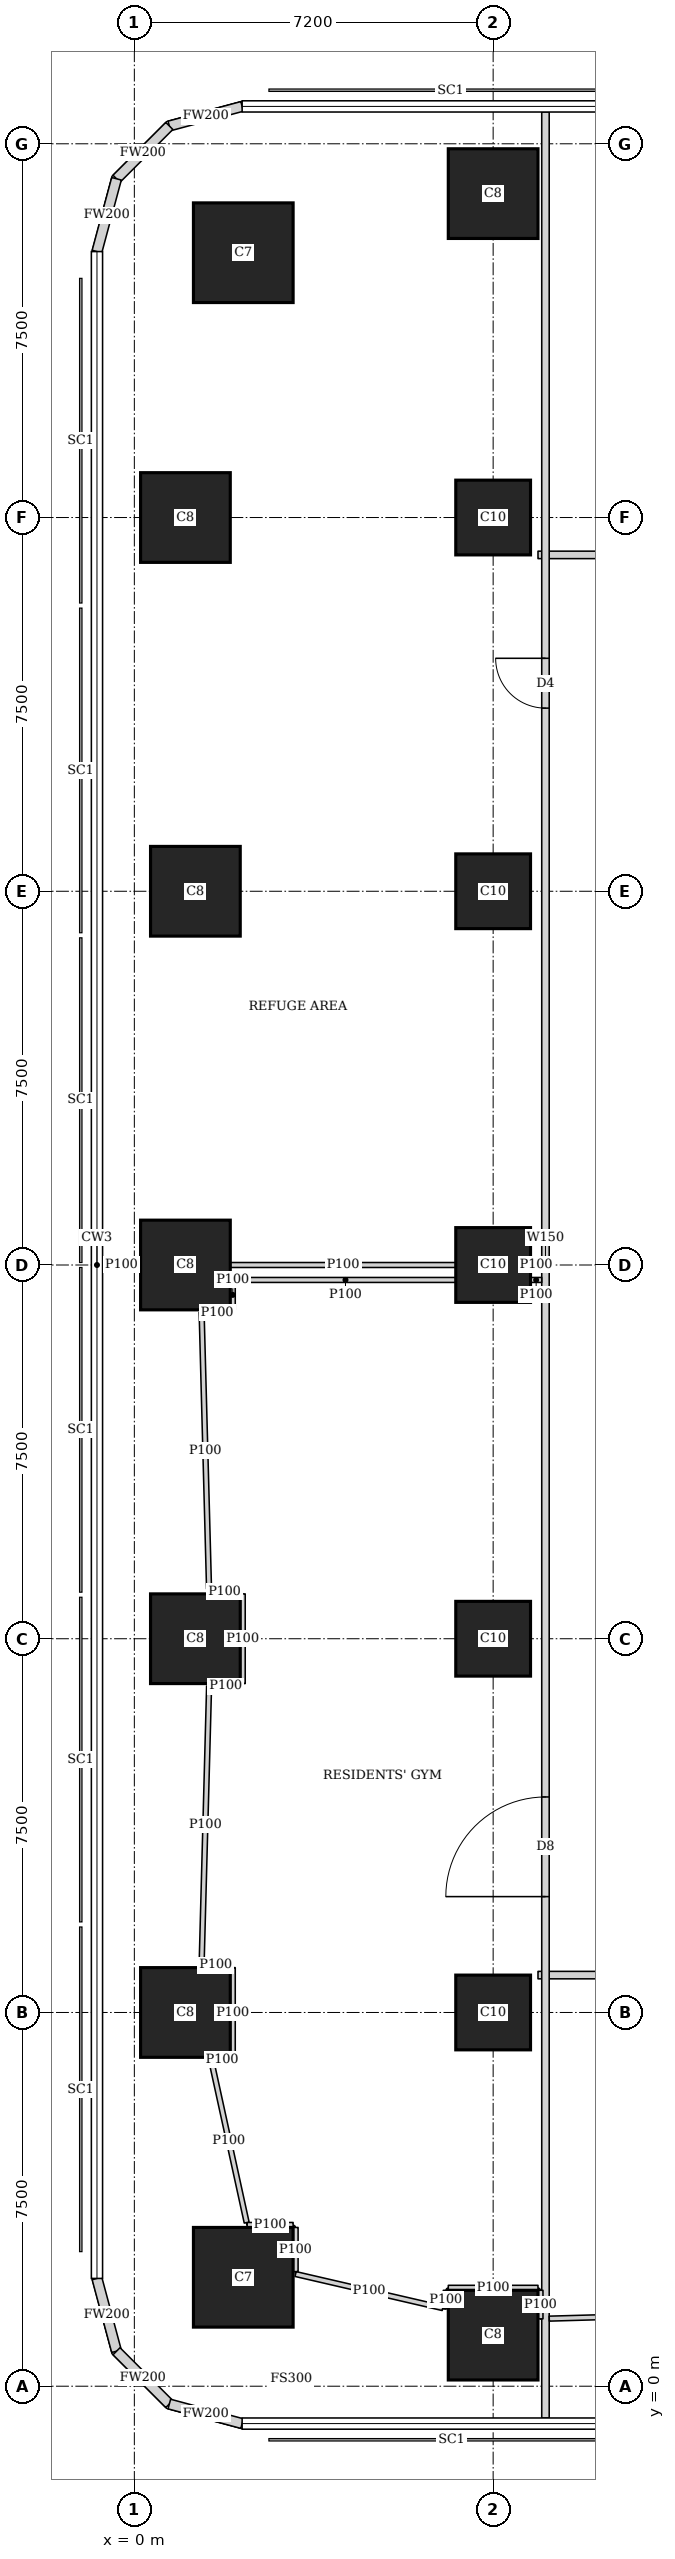
"""IFC4 building model, lengths in metres.
Left out: names, types, materials, properties, quantities, classifications, styles, units other than length and angle.
Written with IfcOpenShell. Run it as: python <this file> out.ifc"""

import sys

from ifc_helpers import new_model, si_unit, direction, frame, frame_2d, origin, origin_2d, place, context, subcontext, project, spatial, rectangle, extrude, element, fill, save


model = new_model("IFC4")
c1 = context("Model", 3, precision=1e-05, world=origin(), true_north=direction((0.0, 1.0)))
c2 = subcontext(c1, "Body", "Model", "MODEL_VIEW")
j1 = project(units=[si_unit("LENGTHUNIT", "METRE"), si_unit("PLANEANGLEUNIT", "RADIAN")], contexts=[c1])
p1 = place(None, origin())
s1 = spatial("IfcSite", under=j1, at=p1, CompositionType="ELEMENT")
p2 = place(p1, origin())
s2 = spatial("IfcBuilding", under=s1, at=p2, CompositionType="ELEMENT")
p3 = place(p2, frame((0.0, 0.0, 188.3)))
s3 = spatial("IfcBuildingStorey", under=s2, at=p3, CompositionType="ELEMENT", Elevation=188.3)
p4 = place(p3, frame((7.2, 1.025, 0.0), z_axis=(0.0, 0.0, 1.0), x_axis=(1.0, 0.0, 0.0)))
e1 = element("IfcColumn", 1, at=p4, inside=s3, PredefinedType="COLUMN", context=c2, shape_type="SweptSolid", body=[
    extrude(rectangle(XDim=1.8, YDim=1.8, at=origin_2d()), origin(), (0.0, 0.0, 1.0), 5.4),
])
p5 = place(p3, frame((2.186, 2.186, 0.0), z_axis=(0.0, 0.0, 1.0), x_axis=(1.0, 0.0, 0.0)))
e2 = element("IfcColumn", 2, at=p5, inside=s3, PredefinedType="COLUMN", context=c2, shape_type="SweptSolid", body=[
    extrude(rectangle(XDim=2.0, YDim=2.0, at=origin_2d()), origin(), (0.0, 0.0, 1.0), 5.4),
])
p6 = place(p3, frame((1.025, 7.5, 0.0), z_axis=(0.0, 0.0, 1.0), x_axis=(1.0, 0.0, 0.0)))
e3 = element("IfcColumn", 3, at=p6, inside=s3, PredefinedType="COLUMN", context=c2, shape_type="SweptSolid", body=[
    extrude(rectangle(XDim=1.8, YDim=1.8, at=origin_2d()), origin(), (0.0, 0.0, 1.0), 5.4),
])
p7 = place(p3, frame((7.2, 7.5, 0.0), z_axis=(0.0, 0.0, 1.0), x_axis=(1.0, 0.0, 0.0)))
e4 = element("IfcColumn", 4, at=p7, inside=s3, PredefinedType="COLUMN", context=c2, shape_type="SweptSolid", body=[
    extrude(rectangle(XDim=1.5, YDim=1.5, at=origin_2d()), origin(), (0.0, 0.0, 1.0), 5.4),
])
p8 = place(p3, frame((1.225, 15.0, 0.0), z_axis=(0.0, 0.0, 1.0), x_axis=(1.0, 0.0, 0.0)))
e5 = element("IfcColumn", 5, at=p8, inside=s3, PredefinedType="COLUMN", context=c2, shape_type="SweptSolid", body=[
    extrude(rectangle(XDim=1.8, YDim=1.8, at=origin_2d()), origin(), (0.0, 0.0, 1.0), 5.4),
])
p9 = place(p3, frame((7.2, 15.0, 0.0), z_axis=(0.0, 0.0, 1.0), x_axis=(1.0, 0.0, 0.0)))
e6 = element("IfcColumn", 6, at=p9, inside=s3, PredefinedType="COLUMN", context=c2, shape_type="SweptSolid", body=[
    extrude(rectangle(XDim=1.5, YDim=1.5, at=origin_2d()), origin(), (0.0, 0.0, 1.0), 5.4),
])
p10 = place(p3, frame((1.025, 22.5, 0.0), z_axis=(0.0, 0.0, 1.0), x_axis=(1.0, 0.0, 0.0)))
e7 = element("IfcColumn", 7, at=p10, inside=s3, PredefinedType="COLUMN", context=c2, shape_type="SweptSolid", body=[
    extrude(rectangle(XDim=1.8, YDim=1.8, at=origin_2d()), origin(), (0.0, 0.0, 1.0), 5.4),
])
p11 = place(p3, frame((7.2, 22.5, 0.0), z_axis=(0.0, 0.0, 1.0), x_axis=(1.0, 0.0, 0.0)))
e8 = element("IfcColumn", 8, at=p11, inside=s3, PredefinedType="COLUMN", context=c2, shape_type="SweptSolid", body=[
    extrude(rectangle(XDim=1.5, YDim=1.5, at=origin_2d()), origin(), (0.0, 0.0, 1.0), 5.4),
])
p12 = place(p3, frame((1.225, 30.0, 0.0), z_axis=(0.0, 0.0, 1.0), x_axis=(1.0, 0.0, 0.0)))
e9 = element("IfcColumn", 9, at=p12, inside=s3, PredefinedType="COLUMN", context=c2, shape_type="SweptSolid", body=[
    extrude(rectangle(XDim=1.8, YDim=1.8, at=origin_2d()), origin(), (0.0, 0.0, 1.0), 5.4),
])
p13 = place(p3, frame((7.2, 30.0, 0.0), z_axis=(0.0, 0.0, 1.0), x_axis=(1.0, 0.0, 0.0)))
e10 = element("IfcColumn", 10, at=p13, inside=s3, PredefinedType="COLUMN", context=c2, shape_type="SweptSolid", body=[
    extrude(rectangle(XDim=1.5, YDim=1.5, at=origin_2d()), origin(), (0.0, 0.0, 1.0), 5.4),
])
p14 = place(p3, frame((1.025, 37.5, 0.0), z_axis=(0.0, 0.0, 1.0), x_axis=(1.0, 0.0, 0.0)))
e11 = element("IfcColumn", 11, at=p14, inside=s3, PredefinedType="COLUMN", context=c2, shape_type="SweptSolid", body=[
    extrude(rectangle(XDim=1.8, YDim=1.8, at=origin_2d()), origin(), (0.0, 0.0, 1.0), 5.4),
])
p15 = place(p3, frame((7.2, 37.5, 0.0), z_axis=(0.0, 0.0, 1.0), x_axis=(1.0, 0.0, 0.0)))
e12 = element("IfcColumn", 12, at=p15, inside=s3, PredefinedType="COLUMN", context=c2, shape_type="SweptSolid", body=[
    extrude(rectangle(XDim=1.5, YDim=1.5, at=origin_2d()), origin(), (0.0, 0.0, 1.0), 5.4),
])
p16 = place(p3, frame((2.186, 42.814, 0.0), z_axis=(0.0, 0.0, 1.0), x_axis=(1.0, 0.0, 0.0)))
e13 = element("IfcColumn", 13, at=p16, inside=s3, PredefinedType="COLUMN", context=c2, shape_type="SweptSolid", body=[
    extrude(rectangle(XDim=2.0, YDim=2.0, at=origin_2d()), origin(), (0.0, 0.0, 1.0), 5.4),
])
p17 = place(p3, frame((7.2, 44.0, 0.0), z_axis=(0.0, 0.0, 1.0), x_axis=(1.0, 0.0, 0.0)))
e14 = element("IfcColumn", 14, at=p17, inside=s3, PredefinedType="COLUMN", context=c2, shape_type="SweptSolid", body=[
    extrude(rectangle(XDim=1.8, YDim=1.8, at=origin_2d()), origin(), (0.0, 0.0, 1.0), 5.4),
])
p18 = place(p3, frame((2.163, 45.75, 0.0), z_axis=(0.0, 0.0, 1.0), x_axis=(-0.965832000415, -0.259168954497, 0.0)))
e15 = element("IfcWall", 15, at=p18, inside=s3, PredefinedType="SOLIDWALL", context=c2, shape_type="SweptSolid", body=[
    extrude(rectangle(XDim=1.513, YDim=0.2, at=frame_2d((0.756, 0.0))), origin(), (0.0, 0.0, 1.0), 5.15),
])
p19 = place(p3, frame((0.702, 45.358, 0.0), z_axis=(0.0, 0.0, 1.0), x_axis=(-0.707106781187, -0.707106781187, 0.0)))
e16 = element("IfcWall", 16, at=p19, inside=s3, PredefinedType="SOLIDWALL", context=c2, shape_type="SweptSolid", body=[
    extrude(rectangle(XDim=1.499, YDim=0.2, at=frame_2d((0.75, 0.0))), origin(), (0.0, 0.0, 1.0), 5.15),
])
for number, where, z_axis, x_axis in (
    (17, (-0.358, 44.298, 0.0), (0.0, 0.0, 1.0), (-0.259, -0.966, 0.0)),
    (18, (-0.75, 2.163, 0.0), (0.0, 0.0, 1.0), (0.259, -0.966, 0.0)),
):
    element("IfcWall", number, at=place(p3, frame(where, z_axis=z_axis, x_axis=x_axis)), inside=s3, PredefinedType="SOLIDWALL", context=c2, shape_type="SweptSolid", body=[
        extrude(rectangle(XDim=1.513, YDim=0.2, at=frame_2d((0.756, 0.0))), origin(), (0.0, 0.0, 1.0), 5.15),
    ])
p20 = place(p3, frame((-0.358, 0.702, 0.0), z_axis=(0.0, 0.0, 1.0), x_axis=(0.707106781187, -0.707106781187, 0.0)))
e19 = element("IfcWall", 19, at=p20, inside=s3, PredefinedType="SOLIDWALL", context=c2, shape_type="SweptSolid", body=[
    extrude(rectangle(XDim=1.499, YDim=0.2, at=frame_2d((0.75, 0.0))), origin(), (0.0, 0.0, 1.0), 5.15),
])
p21 = place(p3, frame((0.702, -0.358, 0.0), z_axis=(0.0, 0.0, 1.0), x_axis=(0.965832000415, -0.259168954497, 0.0)))
e20 = element("IfcWall", 20, at=p21, inside=s3, PredefinedType="SOLIDWALL", context=c2, shape_type="SweptSolid", body=[
    extrude(rectangle(XDim=1.513, YDim=0.2, at=frame_2d((0.756, 0.0))), origin(), (0.0, 0.0, 1.0), 5.15),
])
p22 = place(p3, frame((8.25, -0.637, 0.0), z_axis=(0.0, 0.0, 1.0), x_axis=(0.0, 1.0, 0.0)))
e21 = element("IfcWall", 21, at=p22, inside=s3, PredefinedType="SOLIDWALL", context=c2, shape_type="SweptSolid", body=[
    extrude(rectangle(XDim=46.275, YDim=0.15, at=frame_2d((23.137, 0.0))), origin(), (0.0, 0.0, 1.0), 3.35),
])
p23 = place(p22, frame((10.462, 0.0, 0.0)))
e22 = element("IfcOpeningElement", 22, at=p23, cuts=e21, PredefinedType="OPENING", context=c2, shape_type="SweptSolid", body=[
    extrude(rectangle(XDim=2.0, YDim=2.1, at=frame_2d((1.0, 1.05))), frame((0.0, 0.085, 0.0), z_axis=(0.0, -1.0, 0.0), x_axis=(1.0, 0.0, 0.0)), (0.0, 0.0, 1.0), 0.17),
])
p24 = place(p22, frame((34.312, 0.0, 0.0)))
e23 = element("IfcOpeningElement", 23, at=p24, cuts=e21, PredefinedType="OPENING", context=c2, shape_type="SweptSolid", body=[
    extrude(rectangle(XDim=1.0, YDim=2.1, at=frame_2d((0.5, 1.05))), frame((0.0, 0.085, 0.0), z_axis=(0.0, -1.0, 0.0), x_axis=(1.0, 0.0, 0.0)), (0.0, 0.0, 1.0), 0.17),
])
for number, where, z_axis, x_axis in (
    (24, (13.649, 8.25, 0.0), (0.0, 0.0, 1.0), (-1.0, 0.0, 0.0)),
    (25, (8.1, 36.75, 0.0), (0.0, 0.0, 1.0), (1.0, 0.0, 0.0)),
):
    element("IfcWall", number, at=place(p3, frame(where, z_axis=z_axis, x_axis=x_axis)), inside=s3, PredefinedType="SOLIDWALL", context=c2, shape_type="SweptSolid", body=[
        extrude(rectangle(XDim=5.549, YDim=0.15, at=frame_2d((2.774, 0.0))), origin(), (0.0, 0.0, 1.0), 3.55),
    ])
p25 = place(p3, frame((-0.637, 22.5, 0.0), z_axis=(0.0, 0.0, 1.0), x_axis=(1.0, 0.0, 0.0)))
e26 = element("IfcWall", 26, at=p25, inside=s3, PredefinedType="PARTITIONING", context=c2, shape_type="SweptSolid", body=[
    extrude(rectangle(XDim=0.761, YDim=0.1, at=frame_2d((0.38, 0.0))), origin(), (0.0, 0.0, 1.0), 5.15),
])
p26 = place(p3, frame((1.926, 22.5, 0.0), z_axis=(0.0, 0.0, 1.0), x_axis=(1.0, 0.0, 0.0)))
e27 = element("IfcWall", 27, at=p26, inside=s3, PredefinedType="PARTITIONING", context=c2, shape_type="SweptSolid", body=[
    extrude(rectangle(XDim=4.523, YDim=0.1, at=frame_2d((2.261, 0.0))), origin(), (0.0, 0.0, 1.0), 3.55),
])
p27 = place(p3, frame((7.951, 22.5, 0.0), z_axis=(0.0, 0.0, 1.0), x_axis=(1.0, 0.0, 0.0)))
e28 = element("IfcWall", 28, at=p27, inside=s3, PredefinedType="PARTITIONING", context=c2, shape_type="SweptSolid", body=[
    extrude(rectangle(XDim=0.224, YDim=0.1, at=frame_2d((0.112, 0.0))), origin(), (0.0, 0.0, 1.0), 3.55),
])
p28 = place(p3, frame((13.4, 1.498, 0.0), z_axis=(0.0, 0.0, 1.0), x_axis=(-0.999608128068, -0.027992682988, 0.0)))
e29 = element("IfcWall", 29, at=p28, inside=s3, PredefinedType="PARTITIONING", context=c2, shape_type="SweptSolid", body=[
    extrude(rectangle(XDim=5.076, YDim=0.1, at=frame_2d((2.538, 0.0))), origin(), (0.0, 0.0, 1.0), 3.35),
])
p29 = place(p3, frame((8.15, 1.352, 0.0), z_axis=(0.0, 0.0, 1.0), x_axis=(0.0, 1.0, 0.0)))
e30 = element("IfcWall", 30, at=p29, inside=s3, PredefinedType="PARTITIONING", context=c2, shape_type="SweptSolid", body=[
    extrude(rectangle(XDim=0.573, YDim=0.1, at=frame_2d((0.287, 0.0))), origin(), (0.0, 0.0, 1.0), 3.35),
])
p30 = place(p3, frame((8.1, 1.975, 0.0), z_axis=(0.0, 0.0, 1.0), x_axis=(-1.0, 0.0, 0.0)))
e31 = element("IfcWall", 31, at=p30, inside=s3, PredefinedType="PARTITIONING", context=c2, shape_type="SweptSolid", body=[
    extrude(rectangle(XDim=1.8, YDim=0.1, at=frame_2d((0.9, 0.0))), origin(), (0.0, 0.0, 1.0), 3.35),
])
p31 = place(p3, frame((6.25, 1.925, 0.0), z_axis=(0.0, 0.0, 1.0), x_axis=(0.0, -1.0, 0.0)))
e32 = element("IfcWall", 32, at=p31, inside=s3, PredefinedType="PARTITIONING", context=c2, shape_type="SweptSolid", body=[
    extrude(rectangle(XDim=0.372, YDim=0.1, at=frame_2d((0.186, 0.0))), origin(), (0.0, 0.0, 1.0), 3.35),
])
p32 = place(p3, frame((6.189, 1.567, 0.0), z_axis=(0.0, 0.0, 1.0), x_axis=(-0.974199433665, 0.225688864252, 0.0)))
e33 = element("IfcWall", 33, at=p32, inside=s3, PredefinedType="PARTITIONING", context=c2, shape_type="SweptSolid", body=[
    extrude(rectangle(XDim=3.031, YDim=0.1, at=frame_2d((1.516, 0.0))), origin(), (0.0, 0.0, 1.0), 3.35),
])
p33 = place(p3, frame((3.236, 2.3, 0.0), z_axis=(0.0, 0.0, 1.0), x_axis=(0.0, 1.0, 0.0)))
e34 = element("IfcWall", 34, at=p33, inside=s3, PredefinedType="PARTITIONING", context=c2, shape_type="SweptSolid", body=[
    extrude(rectangle(XDim=0.886, YDim=0.1, at=frame_2d((0.443, 0.0))), origin(), (0.0, 0.0, 1.0), 3.35),
])
p34 = place(p3, frame((3.186, 3.236, 0.0), z_axis=(0.0, 0.0, 1.0), x_axis=(-1.0, 0.0, 0.0)))
e35 = element("IfcWall", 35, at=p34, inside=s3, PredefinedType="PARTITIONING", context=c2, shape_type="SweptSolid", body=[
    extrude(rectangle(XDim=0.922, YDim=0.1, at=frame_2d((0.461, 0.0))), origin(), (0.0, 0.0, 1.0), 3.35),
])
p35 = place(p3, frame((2.254, 3.284, 0.0), z_axis=(0.0, 0.0, 1.0), x_axis=(-0.213527004162, 0.976937161998, 0.0)))
e36 = element("IfcWall", 36, at=p35, inside=s3, PredefinedType="PARTITIONING", context=c2, shape_type="SweptSolid", body=[
    extrude(rectangle(XDim=3.343, YDim=0.1, at=frame_2d((1.672, 0.0))), origin(), (0.0, 0.0, 1.0), 3.35),
])
p36 = place(p3, frame((1.602, 6.55, 0.0), z_axis=(0.0, 0.0, 1.0), x_axis=(1.0, 0.0, 0.0)))
e37 = element("IfcWall", 37, at=p36, inside=s3, PredefinedType="PARTITIONING", context=c2, shape_type="SweptSolid", body=[
    extrude(rectangle(XDim=0.323, YDim=0.1, at=frame_2d((0.162, 0.0))), origin(), (0.0, 0.0, 1.0), 3.35),
])
p37 = place(p3, frame((1.975, 6.6, 0.0), z_axis=(0.0, 0.0, 1.0), x_axis=(0.0, 1.0, 0.0)))
e38 = element("IfcWall", 38, at=p37, inside=s3, PredefinedType="PARTITIONING", context=c2, shape_type="SweptSolid", body=[
    extrude(rectangle(XDim=1.8, YDim=0.1, at=frame_2d((0.9, 0.0))), origin(), (0.0, 0.0, 1.0), 3.35),
])
p38 = place(p3, frame((1.925, 8.45, 0.0), z_axis=(0.0, 0.0, 1.0), x_axis=(-1.0, 0.0, 0.0)))
e39 = element("IfcWall", 39, at=p38, inside=s3, PredefinedType="PARTITIONING", context=c2, shape_type="SweptSolid", body=[
    extrude(rectangle(XDim=0.575, YDim=0.1, at=frame_2d((0.288, 0.0))), origin(), (0.0, 0.0, 1.0), 3.35),
])
p39 = place(p3, frame((1.351, 8.501, 0.0), z_axis=(0.0, 0.0, 1.0), x_axis=(0.026828300162, 0.999640056375, 0.0)))
e40 = element("IfcWall", 40, at=p39, inside=s3, PredefinedType="PARTITIONING", context=c2, shape_type="SweptSolid", body=[
    extrude(rectangle(XDim=5.551, YDim=0.1, at=frame_2d((2.775, 0.0))), origin(), (0.0, 0.0, 1.0), 3.35),
])
p40 = place(p3, frame((1.55, 14.05, 0.0), z_axis=(0.0, 0.0, 1.0), x_axis=(1.0, 0.0, 0.0)))
e41 = element("IfcWall", 41, at=p40, inside=s3, PredefinedType="PARTITIONING", context=c2, shape_type="SweptSolid", body=[
    extrude(rectangle(XDim=0.575, YDim=0.1, at=frame_2d((0.288, 0.0))), origin(), (0.0, 0.0, 1.0), 3.35),
])
p41 = place(p3, frame((2.175, 14.1, 0.0), z_axis=(0.0, 0.0, 1.0), x_axis=(0.0, 1.0, 0.0)))
e42 = element("IfcWall", 42, at=p41, inside=s3, PredefinedType="PARTITIONING", context=c2, shape_type="SweptSolid", body=[
    extrude(rectangle(XDim=1.8, YDim=0.1, at=frame_2d((0.9, 0.0))), origin(), (0.0, 0.0, 1.0), 3.55),
])
p42 = place(p3, frame((2.125, 15.95, 0.0), z_axis=(0.0, 0.0, 1.0), x_axis=(-1.0, 0.0, 0.0)))
e43 = element("IfcWall", 43, at=p42, inside=s3, PredefinedType="PARTITIONING", context=c2, shape_type="SweptSolid", body=[
    extrude(rectangle(XDim=0.625, YDim=0.1, at=frame_2d((0.312, 0.0))), origin(), (0.0, 0.0, 1.0), 3.35),
])
p43 = place(p3, frame((1.499, 16.0, 0.0), z_axis=(0.0, 0.0, 1.0), x_axis=(-0.026823582968, 0.999640182964, 0.0)))
e44 = element("IfcWall", 44, at=p43, inside=s3, PredefinedType="PARTITIONING", context=c2, shape_type="SweptSolid", body=[
    extrude(rectangle(XDim=5.552, YDim=0.1, at=frame_2d((2.776, 0.0))), origin(), (0.0, 0.0, 1.0), 3.35),
])
p44 = place(p3, frame((1.401, 21.55, 0.0), z_axis=(0.0, 0.0, 1.0), x_axis=(1.0, 0.0, 0.0)))
e45 = element("IfcWall", 45, at=p44, inside=s3, PredefinedType="PARTITIONING", context=c2, shape_type="SweptSolid", body=[
    extrude(rectangle(XDim=0.524, YDim=0.1, at=frame_2d((0.262, 0.0))), origin(), (0.0, 0.0, 1.0), 3.35),
])
p45 = place(p3, frame((1.975, 21.6, 0.0), z_axis=(0.0, 0.0, 1.0), x_axis=(0.0, 1.0, 0.0)))
e46 = element("IfcWall", 46, at=p45, inside=s3, PredefinedType="PARTITIONING", context=c2, shape_type="SweptSolid", body=[
    extrude(rectangle(XDim=0.6, YDim=0.1, at=frame_2d((0.3, 0.0))), origin(), (0.0, 0.0, 1.0), 3.35),
])
p46 = place(p3, frame((2.025, 22.2, 0.0), z_axis=(0.0, 0.0, 1.0), x_axis=(1.0, 0.0, 0.0)))
e47 = element("IfcWall", 47, at=p46, inside=s3, PredefinedType="PARTITIONING", context=c2, shape_type="SweptSolid", body=[
    extrude(rectangle(XDim=4.424, YDim=0.1, at=frame_2d((2.212, 0.0))), origin(), (0.0, 0.0, 1.0), 3.55),
])
p47 = place(p3, frame((7.951, 22.2, 0.0), z_axis=(0.0, 0.0, 1.0), x_axis=(1.0, 0.0, 0.0)))
e48 = element("IfcWall", 48, at=p47, inside=s3, PredefinedType="PARTITIONING", context=c2, shape_type="SweptSolid", body=[
    extrude(rectangle(XDim=0.224, YDim=0.1, at=frame_2d((0.112, 0.0))), origin(), (0.0, 0.0, 1.0), 3.55),
])
p48 = place(p23, origin())
e49 = element("IfcDoor", 49, at=p48, inside=s3, OperationType="DOUBLE_DOOR_SINGLE_SWING", PredefinedType="DOOR", context=c2, shape_type="SweptSolid", body=[
    extrude(rectangle(XDim=2.0, YDim=2.1, at=frame_2d((1.0, 1.05))), frame((0.0, 0.025, 0.0), z_axis=(0.0, -1.0, 0.0), x_axis=(1.0, 0.0, 0.0)), (0.0, 0.0, 1.0), 0.05),
])
fill(e22, e49)
p49 = place(p24, origin())
e50 = element("IfcDoor", 50, at=p49, inside=s3, OperationType="SINGLE_SWING_RIGHT", PredefinedType="DOOR", context=c2, shape_type="SweptSolid", body=[
    extrude(rectangle(XDim=1.0, YDim=2.1, at=frame_2d((0.5, 1.05))), frame((0.0, 0.025, 0.0), z_axis=(0.0, -1.0, 0.0), x_axis=(1.0, 0.0, 0.0)), (0.0, 0.0, 1.0), 0.05),
])
fill(e23, e50)
save(model, sys.argv[1])
